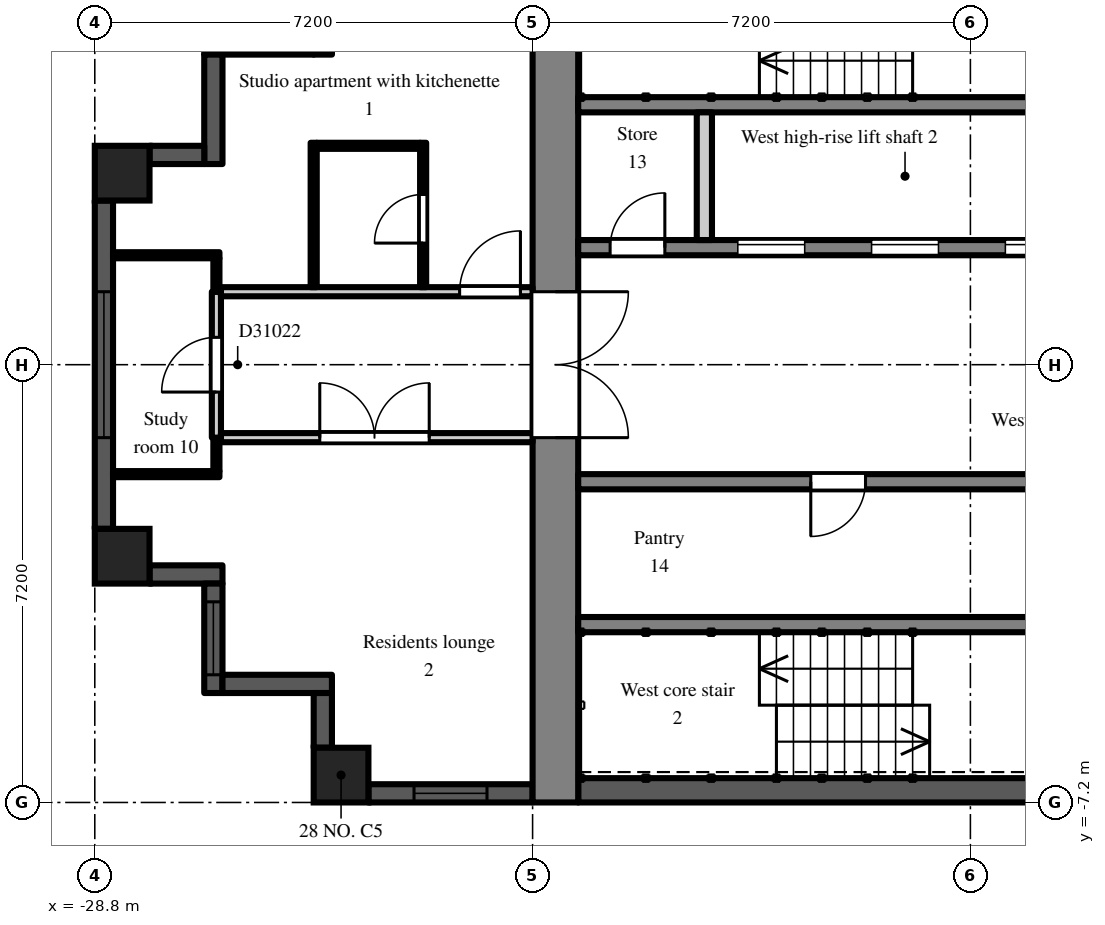
"""IFC4 building model, lengths in metres.
Left out: names, types, materials, properties, quantities, classifications, styles, units other than length and angle.
Written with IfcOpenShell. Run it as: python <this file> out.ifc"""

import sys

from ifc_helpers import new_model, si_unit, direction, frame, frame_2d, origin, origin_2d, place, context, subcontext, project, spatial, rectangle, extrude, element, fill, save


model = new_model("IFC4")
c1 = context("Model", 3, precision=1e-05, world=origin(), true_north=direction((0.0, 1.0)))
c2 = subcontext(c1, "Body", "Model", "MODEL_VIEW")
j1 = project(units=[si_unit("LENGTHUNIT", "METRE"), si_unit("PLANEANGLEUNIT", "RADIAN")], contexts=[c1])
p1 = place(None, origin())
s1 = spatial("IfcSite", under=j1, at=p1, CompositionType="ELEMENT")
p2 = place(p1, origin())
s2 = spatial("IfcBuilding", under=s1, at=p2, CompositionType="ELEMENT")
p3 = place(p2, frame((0.0, 0.0, 216.9)))
s3 = spatial("IfcBuildingStorey", under=s2, at=p3, CompositionType="ELEMENT", Elevation=216.9)
for number, where, z_axis, x_axis in (
    (1, (-28.35, -3.15, 0.0), (0.0, 0.0, 1.0), (1.0, 0.0, 0.0)),
    (2, (-28.35, 3.15, 0.0), (0.0, 0.0, 1.0), (1.0, 0.0, 0.0)),
    (3, (-24.75, -6.75, 0.0), (0.0, 0.0, 1.0), (1.0, 0.0, 0.0)),
):
    element("IfcColumn", number, at=place(p3, frame(where, z_axis=z_axis, x_axis=x_axis)), inside=s3, PredefinedType="COLUMN", context=c2, shape_type="SweptSolid", body=[
        extrude(rectangle(XDim=0.9, YDim=0.9, at=origin_2d()), origin(), (0.0, 0.0, 1.0), 3.0),
    ])
p4 = place(p3, frame((-25.05, 6.3, 0.0), z_axis=(0.0, 0.0, 1.0), x_axis=(0.0, -1.0, 0.0)))
e4 = element("IfcWall", 4, at=p4, inside=s3, PredefinedType="SOLIDWALL", context=c2, shape_type="SweptSolid", body=[
    extrude(rectangle(XDim=1.2, YDim=0.3, at=frame_2d((0.6, 0.0))), origin(), (0.0, 0.0, 1.0), 2.6),
])
p5 = place(p3, frame((-25.2, 5.25, 0.0), z_axis=(0.0, 0.0, 1.0), x_axis=(-1.0, 0.0, 0.0)))
e5 = element("IfcWall", 5, at=p5, inside=s3, PredefinedType="SOLIDWALL", context=c2, shape_type="SweptSolid", body=[
    extrude(rectangle(XDim=1.8, YDim=0.3, at=frame_2d((0.9, 0.0))), origin(), (0.0, 0.0, 1.0), 2.6),
])
p6 = place(p5, frame((0.3, 0.0, 0.2)))
e6 = element("IfcOpeningElement", 6, at=p6, cuts=e5, PredefinedType="OPENING", context=c2, shape_type="SweptSolid", body=[
    extrude(rectangle(XDim=1.2, YDim=1.85, at=frame_2d((0.6, 0.925))), frame((0.0, 0.16, 0.0), z_axis=(0.0, -1.0, 0.0), x_axis=(1.0, 0.0, 0.0)), (0.0, 0.0, 1.0), 0.32),
])
p7 = place(p3, frame((-26.85, 5.1, 0.0), z_axis=(0.0, 0.0, 1.0), x_axis=(0.0, -1.0, 0.0)))
e7 = element("IfcWall", 7, at=p7, inside=s3, PredefinedType="SOLIDWALL", context=c2, shape_type="SweptSolid", body=[
    extrude(rectangle(XDim=1.8, YDim=0.3, at=frame_2d((0.9, 0.0))), origin(), (0.0, 0.0, 1.0), 2.6),
])
p8 = place(p3, frame((-27.0, 3.45, 0.0), z_axis=(0.0, 0.0, 1.0), x_axis=(-1.0, 0.0, 0.0)))
e8 = element("IfcWall", 8, at=p8, inside=s3, PredefinedType="SOLIDWALL", context=c2, shape_type="SweptSolid", body=[
    extrude(rectangle(XDim=0.9, YDim=0.3, at=frame_2d((0.45, 0.0))), origin(), (0.0, 0.0, 1.0), 2.6),
])
p9 = place(p3, frame((-28.65, 2.7, 0.0), z_axis=(0.0, 0.0, 1.0), x_axis=(0.0, -1.0, 0.0)))
e9 = element("IfcWall", 9, at=p9, inside=s3, PredefinedType="SOLIDWALL", context=c2, shape_type="SweptSolid", body=[
    extrude(rectangle(XDim=5.4, YDim=0.3, at=frame_2d((2.7, 0.0))), origin(), (0.0, 0.0, 1.0), 2.3),
])
p10 = place(p9, frame((1.5, 0.0, 0.2)))
e10 = element("IfcOpeningElement", 10, at=p10, cuts=e9, PredefinedType="OPENING", context=c2, shape_type="SweptSolid", body=[
    extrude(rectangle(XDim=2.4, YDim=1.85, at=frame_2d((1.2, 0.925))), frame((0.0, 0.16, 0.0), z_axis=(0.0, -1.0, 0.0), x_axis=(1.0, 0.0, 0.0)), (0.0, 0.0, 1.0), 0.32),
])
p11 = place(p3, frame((-27.9, -3.45, 0.0), z_axis=(0.0, 0.0, 1.0), x_axis=(1.0, 0.0, 0.0)))
e11 = element("IfcWall", 11, at=p11, inside=s3, PredefinedType="SOLIDWALL", context=c2, shape_type="SweptSolid", body=[
    extrude(rectangle(XDim=1.2, YDim=0.3, at=frame_2d((0.6, 0.0))), origin(), (0.0, 0.0, 1.0), 2.6),
])
p12 = place(p3, frame((-26.85, -3.6, 0.0), z_axis=(0.0, 0.0, 1.0), x_axis=(0.0, -1.0, 0.0)))
e12 = element("IfcWall", 12, at=p12, inside=s3, PredefinedType="SOLIDWALL", context=c2, shape_type="SweptSolid", body=[
    extrude(rectangle(XDim=1.8, YDim=0.3, at=frame_2d((0.9, 0.0))), origin(), (0.0, 0.0, 1.0), 2.6),
])
p13 = place(p12, frame((0.3, 0.0, 0.2)))
e13 = element("IfcOpeningElement", 13, at=p13, cuts=e12, PredefinedType="OPENING", context=c2, shape_type="SweptSolid", body=[
    extrude(rectangle(XDim=1.2, YDim=1.85, at=frame_2d((0.6, 0.925))), frame((0.0, 0.16, 0.0), z_axis=(0.0, -1.0, 0.0), x_axis=(1.0, 0.0, 0.0)), (0.0, 0.0, 1.0), 0.32),
])
p14 = place(p3, frame((-26.7, -5.25, 0.0), z_axis=(0.0, 0.0, 1.0), x_axis=(1.0, 0.0, 0.0)))
e14 = element("IfcWall", 14, at=p14, inside=s3, PredefinedType="SOLIDWALL", context=c2, shape_type="SweptSolid", body=[
    extrude(rectangle(XDim=1.8, YDim=0.3, at=frame_2d((0.9, 0.0))), origin(), (0.0, 0.0, 1.0), 2.6),
])
p15 = place(p3, frame((-25.05, -5.4, 0.0), z_axis=(0.0, 0.0, 1.0), x_axis=(0.0, -1.0, 0.0)))
e15 = element("IfcWall", 15, at=p15, inside=s3, PredefinedType="SOLIDWALL", context=c2, shape_type="SweptSolid", body=[
    extrude(rectangle(XDim=0.9, YDim=0.3, at=frame_2d((0.45, 0.0))), origin(), (0.0, 0.0, 1.0), 2.6),
])
p16 = place(p3, frame((-24.3, -7.05, 0.0), z_axis=(0.0, 0.0, 1.0), x_axis=(1.0, 0.0, 0.0)))
e16 = element("IfcWall", 16, at=p16, inside=s3, PredefinedType="SOLIDWALL", context=c2, shape_type="SweptSolid", body=[
    extrude(rectangle(XDim=2.7, YDim=0.3, at=frame_2d((1.35, 0.0))), origin(), (0.0, 0.0, 1.0), 2.3),
])
p17 = place(p16, frame((0.75, 0.0, 0.2)))
e17 = element("IfcOpeningElement", 17, at=p17, cuts=e16, PredefinedType="OPENING", context=c2, shape_type="SweptSolid", body=[
    extrude(rectangle(XDim=1.2, YDim=1.85, at=frame_2d((0.6, 0.925))), frame((0.0, 0.16, 0.0), z_axis=(0.0, -1.0, 0.0), x_axis=(1.0, 0.0, 0.0)), (0.0, 0.0, 1.0), 0.32),
])
p18 = place(p3, frame((-21.225, -7.2, 0.0), z_axis=(0.0, 0.0, 1.0), x_axis=(0.0, 1.0, 0.0)))
e18 = element("IfcWall", 18, at=p18, inside=s3, PredefinedType="SHEAR", context=c2, shape_type="SweptSolid", body=[
    extrude(rectangle(XDim=14.4, YDim=0.75, at=frame_2d((7.2, 0.0))), origin(), (0.0, 0.0, 1.0), 2.6),
])
p19 = place(p18, frame((6.0, 0.0, 0.0)))
e19 = element("IfcOpeningElement", 19, at=p19, cuts=e18, PredefinedType="OPENING", context=c2, shape_type="SweptSolid", body=[
    extrude(rectangle(XDim=2.4, YDim=2.2, at=frame_2d((1.2, 1.1))), frame((0.0, 0.385, 0.0), z_axis=(0.0, -1.0, 0.0), x_axis=(1.0, 0.0, 0.0)), (0.0, 0.0, 1.0), 0.77),
])
p20 = place(p3, frame((-7.9, 1.925, 0.0), z_axis=(0.0, 0.0, 1.0), x_axis=(-1.0, 0.0, 0.0)))
e20 = element("IfcWall", 20, at=p20, inside=s3, PredefinedType="SHEAR", context=c2, shape_type="SweptSolid", body=[
    extrude(rectangle(XDim=12.95, YDim=0.25, at=frame_2d((6.475, 0.0))), origin(), (0.0, 0.0, 1.0), 2.6),
])
p21 = place(p20, frame((4.825, 0.0, 0.0)))
e21 = element("IfcOpeningElement", 21, at=p21, cuts=e20, PredefinedType="OPENING", context=c2, shape_type="SweptSolid", body=[
    extrude(rectangle(XDim=1.1, YDim=2.1, at=frame_2d((0.55, 1.05))), frame((0.0, 0.135, 0.0), z_axis=(0.0, -1.0, 0.0), x_axis=(1.0, 0.0, 0.0)), (0.0, 0.0, 1.0), 0.27),
])
p22 = place(p20, frame((7.025, 0.0, 0.0)))
e22 = element("IfcOpeningElement", 22, at=p22, cuts=e20, PredefinedType="OPENING", context=c2, shape_type="SweptSolid", body=[
    extrude(rectangle(XDim=1.1, YDim=2.1, at=frame_2d((0.55, 1.05))), frame((0.0, 0.135, 0.0), z_axis=(0.0, -1.0, 0.0), x_axis=(1.0, 0.0, 0.0)), (0.0, 0.0, 1.0), 0.27),
])
p23 = place(p20, frame((9.225, 0.0, 0.0)))
e23 = element("IfcOpeningElement", 23, at=p23, cuts=e20, PredefinedType="OPENING", context=c2, shape_type="SweptSolid", body=[
    extrude(rectangle(XDim=1.1, YDim=2.1, at=frame_2d((0.55, 1.05))), frame((0.0, 0.135, 0.0), z_axis=(0.0, -1.0, 0.0), x_axis=(1.0, 0.0, 0.0)), (0.0, 0.0, 1.0), 0.27),
])
p24 = place(p20, frame((0.525, 0.0, 0.0)))
e24 = element("IfcOpeningElement", 24, at=p24, cuts=e20, PredefinedType="OPENING", context=c2, shape_type="SweptSolid", body=[
    extrude(rectangle(XDim=0.9, YDim=2.1, at=frame_2d((0.45, 1.05))), frame((0.0, 0.135, 0.0), z_axis=(0.0, -1.0, 0.0), x_axis=(1.0, 0.0, 0.0)), (0.0, 0.0, 1.0), 0.27),
])
p25 = place(p20, frame((2.625, 0.0, 0.0)))
e25 = element("IfcOpeningElement", 25, at=p25, cuts=e20, PredefinedType="OPENING", context=c2, shape_type="SweptSolid", body=[
    extrude(rectangle(XDim=1.1, YDim=2.1, at=frame_2d((0.55, 1.05))), frame((0.0, 0.135, 0.0), z_axis=(0.0, -1.0, 0.0), x_axis=(1.0, 0.0, 0.0)), (0.0, 0.0, 1.0), 0.27),
])
p26 = place(p20, frame((11.525, 0.0, 0.0)))
e26 = element("IfcOpeningElement", 26, at=p26, cuts=e20, PredefinedType="OPENING", context=c2, shape_type="SweptSolid", body=[
    extrude(rectangle(XDim=0.9, YDim=2.1, at=frame_2d((0.45, 1.05))), frame((0.0, 0.135, 0.0), z_axis=(0.0, -1.0, 0.0), x_axis=(1.0, 0.0, 0.0)), (0.0, 0.0, 1.0), 0.27),
])
p27 = place(p3, frame((-12.3, 4.275, 0.0), z_axis=(0.0, 0.0, 1.0), x_axis=(-1.0, 0.0, 0.0)))
e27 = element("IfcWall", 27, at=p27, inside=s3, PredefinedType="SHEAR", context=c2, shape_type="SweptSolid", body=[
    extrude(rectangle(XDim=8.55, YDim=0.25, at=frame_2d((4.275, 0.0))), origin(), (0.0, 0.0, 1.0), 2.6),
])
p28 = place(p3, frame((-18.775, 2.05, 0.0), z_axis=(0.0, 0.0, 1.0), x_axis=(0.0, 1.0, 0.0)))
e28 = element("IfcWall", 28, at=p28, inside=s3, PredefinedType="PARTITIONING", context=c2, shape_type="SweptSolid", body=[
    extrude(rectangle(XDim=2.1, YDim=0.25, at=frame_2d((1.05, 0.0))), origin(), (0.0, 0.0, 1.0), 2.6),
])
p29 = place(p3, frame((-7.9, -7.0, 0.0), z_axis=(0.0, 0.0, 1.0), x_axis=(-1.0, 0.0, 0.0)))
e29 = element("IfcWall", 29, at=p29, inside=s3, PredefinedType="SHEAR", context=c2, shape_type="SweptSolid", body=[
    extrude(rectangle(XDim=12.95, YDim=0.4, at=frame_2d((6.475, 0.0))), origin(), (0.0, 0.0, 1.0), 2.6),
])
p30 = place(p3, frame((-7.9, -1.925, 0.0), z_axis=(0.0, 0.0, 1.0), x_axis=(-1.0, 0.0, 0.0)))
e30 = element("IfcWall", 30, at=p30, inside=s3, PredefinedType="SHEAR", context=c2, shape_type="SweptSolid", body=[
    extrude(rectangle(XDim=12.95, YDim=0.25, at=frame_2d((6.475, 0.0))), origin(), (0.0, 0.0, 1.0), 2.6),
])
p31 = place(p30, frame((0.525, 0.0, 0.0)))
e31 = element("IfcOpeningElement", 31, at=p31, cuts=e30, PredefinedType="OPENING", context=c2, shape_type="SweptSolid", body=[
    extrude(rectangle(XDim=0.9, YDim=2.1, at=frame_2d((0.45, 1.05))), frame((0.0, 0.135, 0.0), z_axis=(0.0, -1.0, 0.0), x_axis=(1.0, 0.0, 0.0)), (0.0, 0.0, 1.0), 0.27),
])
p32 = place(p30, frame((2.625, 0.0, 0.0)))
e32 = element("IfcOpeningElement", 32, at=p32, cuts=e30, PredefinedType="OPENING", context=c2, shape_type="SweptSolid", body=[
    extrude(rectangle(XDim=1.1, YDim=2.1, at=frame_2d((0.55, 1.05))), frame((0.0, 0.135, 0.0), z_axis=(0.0, -1.0, 0.0), x_axis=(1.0, 0.0, 0.0)), (0.0, 0.0, 1.0), 0.27),
])
p33 = place(p30, frame((8.225, 0.0, 0.0)))
e33 = element("IfcOpeningElement", 33, at=p33, cuts=e30, PredefinedType="OPENING", context=c2, shape_type="SweptSolid", body=[
    extrude(rectangle(XDim=0.9, YDim=2.1, at=frame_2d((0.45, 1.05))), frame((0.0, 0.135, 0.0), z_axis=(0.0, -1.0, 0.0), x_axis=(1.0, 0.0, 0.0)), (0.0, 0.0, 1.0), 0.27),
])
p34 = place(p3, frame((-12.3, -4.275, 0.0), z_axis=(0.0, 0.0, 1.0), x_axis=(-1.0, 0.0, 0.0)))
e34 = element("IfcWall", 34, at=p34, inside=s3, PredefinedType="SHEAR", context=c2, shape_type="SweptSolid", body=[
    extrude(rectangle(XDim=8.55, YDim=0.25, at=frame_2d((4.275, 0.0))), origin(), (0.0, 0.0, 1.0), 2.6),
])
for number, where, z_axis, x_axis in (
    (35, (-28.5, -1.8, 0.0), (0.0, 0.0, 1.0), (1.0, 0.0, 0.0)),
    (36, (-28.5, 1.8, 0.0), (0.0, 0.0, 1.0), (1.0, 0.0, 0.0)),
):
    element("IfcWall", number, at=place(p3, frame(where, z_axis=z_axis, x_axis=x_axis)), inside=s3, PredefinedType="PARTITIONING", context=c2, shape_type="SweptSolid", body=[
        extrude(rectangle(XDim=1.75, YDim=0.1, at=frame_2d((0.875, 0.0))), origin(), (0.0, 0.0, 1.0), 2.6),
    ])
p35 = place(p3, frame((-26.8, -1.75, 0.0), z_axis=(0.0, 0.0, 1.0), x_axis=(0.0, 1.0, 0.0)))
e37 = element("IfcWall", 37, at=p35, inside=s3, PredefinedType="PARTITIONING", context=c2, shape_type="SweptSolid", body=[
    extrude(rectangle(XDim=0.55, YDim=0.1, at=frame_2d((0.275, 0.0))), origin(), (0.0, 0.0, 1.0), 2.6),
])
p36 = place(p3, frame((-26.8, -1.2, 0.0), z_axis=(0.0, 0.0, 1.0), x_axis=(0.0, 1.0, 0.0)))
e38 = element("IfcWall", 38, at=p36, inside=s3, PredefinedType="PARTITIONING", context=c2, shape_type="SweptSolid", body=[
    extrude(rectangle(XDim=2.4, YDim=0.15, at=frame_2d((1.2, 0.0))), origin(), (0.0, 0.0, 1.0), 2.6),
])
p37 = place(p36, frame((0.75, 0.0, 0.0)))
e39 = element("IfcOpeningElement", 39, at=p37, cuts=e38, PredefinedType="OPENING", context=c2, shape_type="SweptSolid", body=[
    extrude(rectangle(XDim=0.9, YDim=2.1, at=frame_2d((0.45, 1.05))), frame((0.0, 0.085, 0.0), z_axis=(0.0, -1.0, 0.0), x_axis=(1.0, 0.0, 0.0)), (0.0, 0.0, 1.0), 0.17),
])
p38 = place(p3, frame((-26.725, -1.2, 0.0), z_axis=(0.0, 0.0, 1.0), x_axis=(1.0, 0.0, 0.0)))
e40 = element("IfcWall", 40, at=p38, inside=s3, PredefinedType="PARTITIONING", context=c2, shape_type="SweptSolid", body=[
    extrude(rectangle(XDim=5.125, YDim=0.15, at=frame_2d((2.562, 0.0))), origin(), (0.0, 0.0, 1.0), 2.6),
])
p39 = place(p38, frame((1.625, 0.0, 0.0)))
e41 = element("IfcOpeningElement", 41, at=p39, cuts=e40, PredefinedType="OPENING", context=c2, shape_type="SweptSolid", body=[
    extrude(rectangle(XDim=1.8, YDim=2.1, at=frame_2d((0.9, 1.05))), frame((0.0, 0.085, 0.0), z_axis=(0.0, -1.0, 0.0), x_axis=(1.0, 0.0, 0.0)), (0.0, 0.0, 1.0), 0.17),
])
p40 = place(p3, frame((-26.8, 1.2, 0.0), z_axis=(0.0, 0.0, 1.0), x_axis=(0.0, 1.0, 0.0)))
e42 = element("IfcWall", 42, at=p40, inside=s3, PredefinedType="PARTITIONING", context=c2, shape_type="SweptSolid", body=[
    extrude(rectangle(XDim=0.55, YDim=0.1, at=frame_2d((0.275, 0.0))), origin(), (0.0, 0.0, 1.0), 2.6),
])
p41 = place(p3, frame((-26.725, 1.2, 0.0), z_axis=(0.0, 0.0, 1.0), x_axis=(1.0, 0.0, 0.0)))
e43 = element("IfcWall", 43, at=p41, inside=s3, PredefinedType="PARTITIONING", context=c2, shape_type="SweptSolid", body=[
    extrude(rectangle(XDim=5.125, YDim=0.15, at=frame_2d((2.562, 0.0))), origin(), (0.0, 0.0, 1.0), 2.6),
])
p42 = place(p41, frame((3.925, 0.0, 0.0)))
e44 = element("IfcOpeningElement", 44, at=p42, cuts=e43, PredefinedType="OPENING", context=c2, shape_type="SweptSolid", body=[
    extrude(rectangle(XDim=1.0, YDim=2.1, at=frame_2d((0.5, 1.05))), frame((0.0, 0.085, 0.0), z_axis=(0.0, -1.0, 0.0), x_axis=(1.0, 0.0, 0.0)), (0.0, 0.0, 1.0), 0.17),
])
p43 = place(p3, frame((-25.2, 1.275, 0.0), z_axis=(0.0, 0.0, 1.0), x_axis=(0.0, 1.0, 0.0)))
e45 = element("IfcWall", 45, at=p43, inside=s3, PredefinedType="PARTITIONING", context=c2, shape_type="SweptSolid", body=[
    extrude(rectangle(XDim=2.375, YDim=0.1, at=frame_2d((1.188, 0.0))), origin(), (0.0, 0.0, 1.0), 2.6),
])
p44 = place(p3, frame((-25.15, 3.6, 0.0), z_axis=(0.0, 0.0, 1.0), x_axis=(1.0, 0.0, 0.0)))
e46 = element("IfcWall", 46, at=p44, inside=s3, PredefinedType="PARTITIONING", context=c2, shape_type="SweptSolid", body=[
    extrude(rectangle(XDim=1.7, YDim=0.1, at=frame_2d((0.85, 0.0))), origin(), (0.0, 0.0, 1.0), 2.6),
])
p45 = place(p3, frame((-23.4, 1.275, 0.0), z_axis=(0.0, 0.0, 1.0), x_axis=(0.0, 1.0, 0.0)))
e47 = element("IfcWall", 47, at=p45, inside=s3, PredefinedType="PARTITIONING", context=c2, shape_type="SweptSolid", body=[
    extrude(rectangle(XDim=2.375, YDim=0.1, at=frame_2d((1.188, 0.0))), origin(), (0.0, 0.0, 1.0), 2.6),
])
p46 = place(p45, frame((0.725, 0.0, 0.0)))
e48 = element("IfcOpeningElement", 48, at=p46, cuts=e47, PredefinedType="OPENING", context=c2, shape_type="SweptSolid", body=[
    extrude(rectangle(XDim=0.8, YDim=2.1, at=frame_2d((0.4, 1.05))), frame((0.0, 0.06, 0.0), z_axis=(0.0, -1.0, 0.0), x_axis=(1.0, 0.0, 0.0)), (0.0, 0.0, 1.0), 0.12),
])
p47 = place(p10, origin())
e49 = element("IfcWindow", 49, at=p47, inside=s3, PartitioningType="SINGLE_PANEL", PredefinedType="WINDOW", context=c2, shape_type="SweptSolid", body=[
    extrude(rectangle(XDim=2.4, YDim=1.85, at=frame_2d((1.2, 0.925))), frame((0.0, 0.03, 0.0), z_axis=(0.0, -1.0, 0.0), x_axis=(1.0, 0.0, 0.0)), (0.0, 0.0, 1.0), 0.06),
])
fill(e10, e49)
p48 = place(p13, origin())
e50 = element("IfcWindow", 50, at=p48, inside=s3, PartitioningType="SINGLE_PANEL", PredefinedType="WINDOW", context=c2, shape_type="SweptSolid", body=[
    extrude(rectangle(XDim=1.2, YDim=1.85, at=frame_2d((0.6, 0.925))), frame((0.0, 0.03, 0.0), z_axis=(0.0, -1.0, 0.0), x_axis=(1.0, 0.0, 0.0)), (0.0, 0.0, 1.0), 0.06),
])
fill(e13, e50)
p49 = place(p17, origin())
e51 = element("IfcWindow", 51, at=p49, inside=s3, PartitioningType="SINGLE_PANEL", PredefinedType="WINDOW", context=c2, shape_type="SweptSolid", body=[
    extrude(rectangle(XDim=1.2, YDim=1.85, at=frame_2d((0.6, 0.925))), frame((0.0, 0.03, 0.0), z_axis=(0.0, -1.0, 0.0), x_axis=(1.0, 0.0, 0.0)), (0.0, 0.0, 1.0), 0.06),
])
fill(e17, e51)
p50 = place(p21, origin())
e52 = element("IfcDoor", 52, at=p50, inside=s3, OperationType="SLIDING_TO_LEFT", PredefinedType="DOOR", context=c2, shape_type="SweptSolid", body=[
    extrude(rectangle(XDim=1.1, YDim=2.1, at=frame_2d((0.55, 1.05))), frame((0.0, 0.025, 0.0), z_axis=(0.0, -1.0, 0.0), x_axis=(1.0, 0.0, 0.0)), (0.0, 0.0, 1.0), 0.05),
])
fill(e21, e52)
p51 = place(p22, origin())
e53 = element("IfcDoor", 53, at=p51, inside=s3, OperationType="SLIDING_TO_LEFT", PredefinedType="DOOR", context=c2, shape_type="SweptSolid", body=[
    extrude(rectangle(XDim=1.1, YDim=2.1, at=frame_2d((0.55, 1.05))), frame((0.0, 0.025, 0.0), z_axis=(0.0, -1.0, 0.0), x_axis=(1.0, 0.0, 0.0)), (0.0, 0.0, 1.0), 0.05),
])
fill(e22, e53)
p52 = place(p23, origin())
e54 = element("IfcDoor", 54, at=p52, inside=s3, OperationType="SLIDING_TO_LEFT", PredefinedType="DOOR", context=c2, shape_type="SweptSolid", body=[
    extrude(rectangle(XDim=1.1, YDim=2.1, at=frame_2d((0.55, 1.05))), frame((0.0, 0.025, 0.0), z_axis=(0.0, -1.0, 0.0), x_axis=(1.0, 0.0, 0.0)), (0.0, 0.0, 1.0), 0.05),
])
fill(e23, e54)
p53 = place(p19, frame((2.4, 0.0, 0.0), z_axis=(0.0, 0.0, 1.0), x_axis=(-1.0, 0.0, 0.0)))
e55 = element("IfcDoor", 55, at=p53, inside=s3, OperationType="DOUBLE_DOOR_DOUBLE_SWING", PredefinedType="DOOR", context=c2, shape_type="SweptSolid", body=[
    extrude(rectangle(XDim=2.4, YDim=2.2, at=frame_2d((1.2, 1.1))), frame((0.0, 0.025, 0.0), z_axis=(0.0, -1.0, 0.0), x_axis=(1.0, 0.0, 0.0)), (0.0, 0.0, 1.0), 0.05),
])
fill(e19, e55)
p54 = place(p26, frame((0.9, 0.0, 0.0), z_axis=(0.0, 0.0, 1.0), x_axis=(-1.0, 0.0, 0.0)))
e56 = element("IfcDoor", 56, at=p54, inside=s3, OperationType="SINGLE_SWING_RIGHT", PredefinedType="DOOR", context=c2, shape_type="SweptSolid", body=[
    extrude(rectangle(XDim=0.9, YDim=2.1, at=frame_2d((0.45, 1.05))), frame((0.0, 0.025, 0.0), z_axis=(0.0, -1.0, 0.0), x_axis=(1.0, 0.0, 0.0)), (0.0, 0.0, 1.0), 0.05),
])
fill(e26, e56)
p55 = place(p33, origin())
e57 = element("IfcDoor", 57, at=p55, inside=s3, OperationType="SINGLE_SWING_RIGHT", PredefinedType="DOOR", context=c2, shape_type="SweptSolid", body=[
    extrude(rectangle(XDim=0.9, YDim=2.1, at=frame_2d((0.45, 1.05))), frame((0.0, 0.025, 0.0), z_axis=(0.0, -1.0, 0.0), x_axis=(1.0, 0.0, 0.0)), (0.0, 0.0, 1.0), 0.05),
])
fill(e33, e57)
p56 = place(p37, origin())
e58 = element("IfcDoor", 58, at=p56, inside=s3, OperationType="SINGLE_SWING_LEFT", PredefinedType="DOOR", context=c2, shape_type="SweptSolid", body=[
    extrude(rectangle(XDim=0.9, YDim=2.1, at=frame_2d((0.45, 1.05))), frame((0.0, 0.025, 0.0), z_axis=(0.0, -1.0, 0.0), x_axis=(1.0, 0.0, 0.0)), (0.0, 0.0, 1.0), 0.05),
])
fill(e39, e58)
p57 = place(p39, origin())
e59 = element("IfcDoor", 59, at=p57, inside=s3, OperationType="DOUBLE_DOOR_DOUBLE_SWING", PredefinedType="DOOR", context=c2, shape_type="SweptSolid", body=[
    extrude(rectangle(XDim=1.8, YDim=2.1, at=frame_2d((0.9, 1.05))), frame((0.0, 0.025, 0.0), z_axis=(0.0, -1.0, 0.0), x_axis=(1.0, 0.0, 0.0)), (0.0, 0.0, 1.0), 0.05),
])
fill(e41, e59)
p58 = place(p46, origin())
e60 = element("IfcDoor", 60, at=p58, inside=s3, OperationType="SINGLE_SWING_LEFT", PredefinedType="DOOR", context=c2, shape_type="SweptSolid", body=[
    extrude(rectangle(XDim=0.8, YDim=2.1, at=frame_2d((0.4, 1.05))), frame((0.0, 0.025, 0.0), z_axis=(0.0, -1.0, 0.0), x_axis=(1.0, 0.0, 0.0)), (0.0, 0.0, 1.0), 0.05),
])
fill(e48, e60)
p59 = place(p42, origin())
e61 = element("IfcDoor", 61, at=p59, inside=s3, OperationType="SINGLE_SWING_RIGHT", PredefinedType="DOOR", context=c2, shape_type="SweptSolid", body=[
    extrude(rectangle(XDim=1.0, YDim=2.1, at=frame_2d((0.5, 1.05))), frame((0.0, 0.025, 0.0), z_axis=(0.0, -1.0, 0.0), x_axis=(1.0, 0.0, 0.0)), (0.0, 0.0, 1.0), 0.05),
])
fill(e44, e61)
save(model, sys.argv[1])
